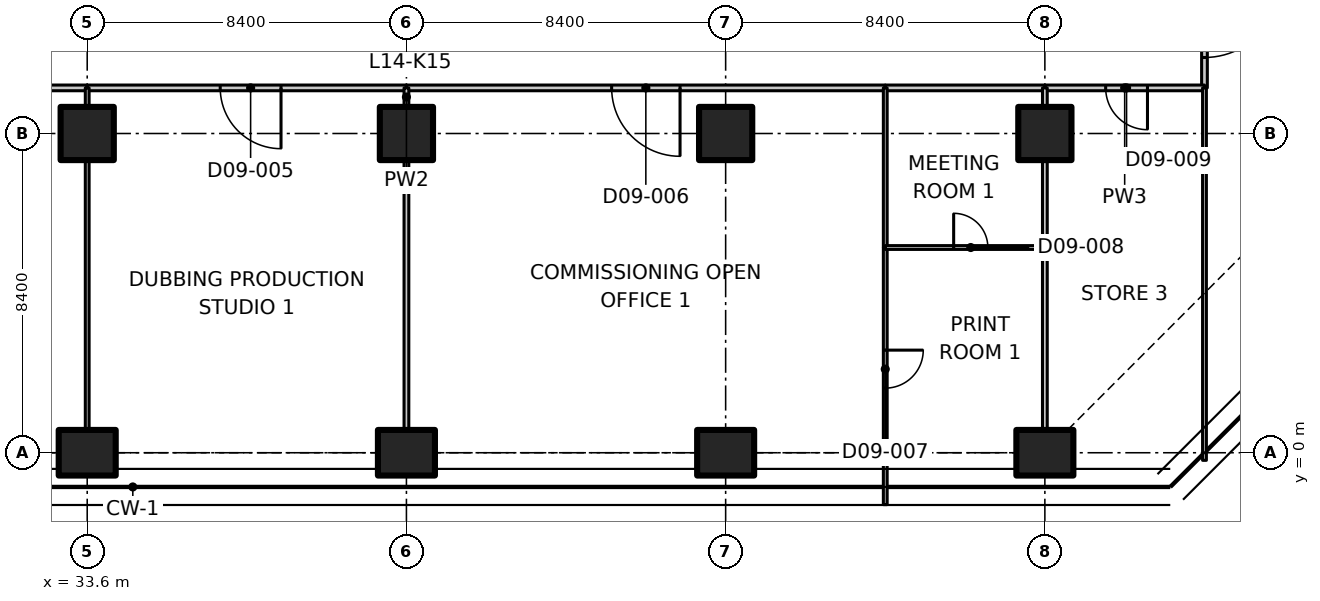
"""IFC4 building model, lengths in metres.
Left out: names, types, materials, properties, quantities, classifications, styles, units other than length and angle.
Written with IfcOpenShell. Run it as: python <this file> out.ifc"""

import sys

from ifc_helpers import new_model, si_unit, direction, frame, frame_2d, origin, origin_2d, place, context, subcontext, project, spatial, polyline, rectangle, outline, extrude, element, fill, save


model = new_model("IFC4")
c1 = context("Model", 3, precision=1e-05, world=origin(), true_north=direction((0.0, 1.0)))
c2 = subcontext(c1, "Body", "Model", "MODEL_VIEW")
j1 = project(units=[si_unit("LENGTHUNIT", "METRE"), si_unit("PLANEANGLEUNIT", "RADIAN")], contexts=[c1])
p1 = place(None, origin())
s1 = spatial("IfcSite", under=j1, at=p1, CompositionType="ELEMENT")
p2 = place(p1, origin())
s2 = spatial("IfcBuilding", under=s1, at=p2, CompositionType="ELEMENT")
p3 = place(p2, frame((0.0, 0.0, 65.3)))
s3 = spatial("IfcBuildingStorey", under=s2, at=p3, CompositionType="ELEMENT", Elevation=65.3)
p4 = place(p3, frame((33.6, 0.0, 0.0), z_axis=(0.0, 0.0, 1.0), x_axis=(0.0, 1.0, 0.0)))
e1 = element("IfcColumn", 1, at=p4, inside=s3, PredefinedType="COLUMN", context=c2, shape_type="SweptSolid", body=[
    extrude(rectangle(XDim=1.2, YDim=1.5, at=origin_2d()), origin(), (0.0, 0.0, 1.0), 3.35),
])
p5 = place(p3, frame((33.6, 8.4, 0.0), z_axis=(0.0, 0.0, 1.0), x_axis=(1.0, 0.0, 0.0)))
e2 = element("IfcColumn", 2, at=p5, inside=s3, PredefinedType="COLUMN", context=c2, shape_type="SweptSolid", body=[
    extrude(rectangle(XDim=1.4, YDim=1.4, at=origin_2d()), origin(), (0.0, 0.0, 1.0), 3.35),
])
p6 = place(p3, frame((42.0, 0.0, 0.0), z_axis=(0.0, 0.0, 1.0), x_axis=(0.0, 1.0, 0.0)))
e3 = element("IfcColumn", 3, at=p6, inside=s3, PredefinedType="COLUMN", context=c2, shape_type="SweptSolid", body=[
    extrude(rectangle(XDim=1.2, YDim=1.5, at=origin_2d()), origin(), (0.0, 0.0, 1.0), 3.35),
])
p7 = place(p3, frame((42.0, 8.4, 0.0), z_axis=(0.0, 0.0, 1.0), x_axis=(1.0, 0.0, 0.0)))
e4 = element("IfcColumn", 4, at=p7, inside=s3, PredefinedType="COLUMN", context=c2, shape_type="SweptSolid", body=[
    extrude(rectangle(XDim=1.4, YDim=1.4, at=origin_2d()), origin(), (0.0, 0.0, 1.0), 3.35),
])
p8 = place(p3, frame((50.4, 0.0, 0.0), z_axis=(0.0, 0.0, 1.0), x_axis=(0.0, 1.0, 0.0)))
e5 = element("IfcColumn", 5, at=p8, inside=s3, PredefinedType="COLUMN", context=c2, shape_type="SweptSolid", body=[
    extrude(rectangle(XDim=1.2, YDim=1.5, at=origin_2d()), origin(), (0.0, 0.0, 1.0), 3.35),
])
p9 = place(p3, frame((50.4, 8.4, 0.0), z_axis=(0.0, 0.0, 1.0), x_axis=(1.0, 0.0, 0.0)))
e6 = element("IfcColumn", 6, at=p9, inside=s3, PredefinedType="COLUMN", context=c2, shape_type="SweptSolid", body=[
    extrude(rectangle(XDim=1.4, YDim=1.4, at=origin_2d()), origin(), (0.0, 0.0, 1.0), 3.35),
])
p10 = place(p3, frame((58.8, 0.0, 0.0), z_axis=(0.0, 0.0, 1.0), x_axis=(0.0, 1.0, 0.0)))
e7 = element("IfcColumn", 7, at=p10, inside=s3, PredefinedType="COLUMN", context=c2, shape_type="SweptSolid", body=[
    extrude(rectangle(XDim=1.2, YDim=1.5, at=origin_2d()), origin(), (0.0, 0.0, 1.0), 3.35),
])
p11 = place(p3, frame((58.8, 8.4, 0.0), z_axis=(0.0, 0.0, 1.0), x_axis=(1.0, 0.0, 0.0)))
e8 = element("IfcColumn", 8, at=p11, inside=s3, PredefinedType="COLUMN", context=c2, shape_type="SweptSolid", body=[
    extrude(rectangle(XDim=1.4, YDim=1.4, at=origin_2d()), origin(), (0.0, 0.0, 1.0), 3.35),
])
p12 = place(p3, frame((63.0, 13.0, 0.0), z_axis=(0.0, 0.0, 1.0), x_axis=(0.0, -1.0, 0.0)))
e9 = element("IfcWall", 9, at=p12, inside=s3, PredefinedType="PARTITIONING", context=c2, shape_type="SweptSolid", body=[
    extrude(rectangle(XDim=3.4, YDim=0.15, at=frame_2d((1.7, 0.0))), origin(), (0.0, 0.0, 1.0), 3.33),
])
p13 = place(p12, frame((0.6, 0.0, 0.0)))
e10 = element("IfcOpeningElement", 10, at=p13, cuts=e9, PredefinedType="OPENING", context=c2, shape_type="SweptSolid", body=[
    extrude(rectangle(XDim=2.0, YDim=2.4, at=frame_2d((1.0, 1.2))), frame((0.0, 0.085, 0.0), z_axis=(0.0, -1.0, 0.0), x_axis=(1.0, 0.0, 0.0)), (0.0, 0.0, 1.0), 0.17),
])
p14 = place(p3, frame((33.6, 9.6, 0.0), z_axis=(0.0, 0.0, 1.0), x_axis=(-1.0, 0.0, 0.0)))
e11 = element("IfcWall", 11, at=p14, inside=s3, PredefinedType="PARTITIONING", context=c2, shape_type="SweptSolid", body=[
    extrude(rectangle(XDim=4.2, YDim=0.15, at=frame_2d((2.1, 0.0))), origin(), (0.0, 0.0, 1.0), 3.33),
])
p15 = place(p14, frame((1.5, 0.0, 0.0)))
e12 = element("IfcOpeningElement", 12, at=p15, cuts=e11, PredefinedType="OPENING", context=c2, shape_type="SweptSolid", body=[
    extrude(rectangle(XDim=1.1, YDim=2.1, at=frame_2d((0.55, 1.05))), frame((0.0, 0.085, 0.0), z_axis=(0.0, -1.0, 0.0), x_axis=(1.0, 0.0, 0.0)), (0.0, 0.0, 1.0), 0.17),
])
p16 = place(p3, frame((42.0, 9.6, 0.0), z_axis=(0.0, 0.0, 1.0), x_axis=(-1.0, 0.0, 0.0)))
e13 = element("IfcWall", 13, at=p16, inside=s3, PredefinedType="PARTITIONING", context=c2, shape_type="SweptSolid", body=[
    extrude(rectangle(XDim=8.4, YDim=0.15, at=frame_2d((4.2, 0.0))), origin(), (0.0, 0.0, 1.0), 3.33),
])
p17 = place(p16, frame((3.3, 0.0, 0.0)))
e14 = element("IfcOpeningElement", 14, at=p17, cuts=e13, PredefinedType="OPENING", context=c2, shape_type="SweptSolid", body=[
    extrude(rectangle(XDim=1.6, YDim=2.1, at=frame_2d((0.8, 1.05))), frame((0.0, 0.085, 0.0), z_axis=(0.0, -1.0, 0.0), x_axis=(1.0, 0.0, 0.0)), (0.0, 0.0, 1.0), 0.17),
])
p18 = place(p3, frame((54.6, 9.6, 0.0), z_axis=(0.0, 0.0, 1.0), x_axis=(-1.0, 0.0, 0.0)))
e15 = element("IfcWall", 15, at=p18, inside=s3, PredefinedType="PARTITIONING", context=c2, shape_type="SweptSolid", body=[
    extrude(rectangle(XDim=12.6, YDim=0.15, at=frame_2d((6.3, 0.0))), origin(), (0.0, 0.0, 1.0), 3.33),
])
p19 = place(p18, frame((5.4, 0.0, 0.0)))
e16 = element("IfcOpeningElement", 16, at=p19, cuts=e15, PredefinedType="OPENING", context=c2, shape_type="SweptSolid", body=[
    extrude(rectangle(XDim=1.8, YDim=2.1, at=frame_2d((0.9, 1.05))), frame((0.0, 0.085, 0.0), z_axis=(0.0, -1.0, 0.0), x_axis=(1.0, 0.0, 0.0)), (0.0, 0.0, 1.0), 0.17),
])
p20 = place(p3, frame((58.8, 9.6, 0.0), z_axis=(0.0, 0.0, 1.0), x_axis=(-1.0, 0.0, 0.0)))
e17 = element("IfcWall", 17, at=p20, inside=s3, PredefinedType="PARTITIONING", context=c2, shape_type="SweptSolid", body=[
    extrude(rectangle(XDim=4.2, YDim=0.15, at=frame_2d((2.1, 0.0))), origin(), (0.0, 0.0, 1.0), 3.33),
])
p21 = place(p3, frame((63.0, 9.6, 0.0), z_axis=(0.0, 0.0, 1.0), x_axis=(-1.0, 0.0, 0.0)))
e18 = element("IfcWall", 18, at=p21, inside=s3, PredefinedType="PARTITIONING", context=c2, shape_type="SweptSolid", body=[
    extrude(rectangle(XDim=4.2, YDim=0.15, at=frame_2d((2.1, 0.0))), origin(), (0.0, 0.0, 1.0), 3.33),
])
p22 = place(p21, frame((1.5, 0.0, 0.0)))
e19 = element("IfcOpeningElement", 19, at=p22, cuts=e18, PredefinedType="OPENING", context=c2, shape_type="SweptSolid", body=[
    extrude(rectangle(XDim=1.1, YDim=2.1, at=frame_2d((0.55, 1.05))), frame((0.0, 0.085, 0.0), z_axis=(0.0, -1.0, 0.0), x_axis=(1.0, 0.0, 0.0)), (0.0, 0.0, 1.0), 0.17),
])
p23 = place(p3, frame((63.0, -0.2, 0.0), z_axis=(0.0, 0.0, 1.0), x_axis=(0.0, 1.0, 0.0)))
e20 = element("IfcWall", 20, at=p23, inside=s3, PredefinedType="PARTITIONING", context=c2, shape_type="SweptSolid", body=[
    extrude(outline(polyline([(0.0, 0.0), (9.8, 0.0), (9.8, 3.33), (5.066, 3.33), (5.064, 2.98), (3.736, 2.98), (3.734, 3.33), (0.0, 3.33), (0.0, 0.0)])), frame((0.0, 0.05, 0.0), z_axis=(0.0, -1.0, 0.0), x_axis=(1.0, 0.0, 0.0)), (0.0, 0.0, 1.0), 0.1),
])
p24 = place(p3, frame((33.6, 9.6, 0.0), z_axis=(0.0, 0.0, 1.0), x_axis=(0.0, -1.0, 0.0)))
e21 = element("IfcWall", 21, at=p24, inside=s3, PredefinedType="PARTITIONING", context=c2, shape_type="SweptSolid", body=[
    extrude(rectangle(XDim=0.48, YDim=0.1, at=frame_2d((0.24, 0.0))), origin(), (0.0, 0.0, 1.0), 3.33),
])
p25 = place(p3, frame((33.6, 7.68, 0.0), z_axis=(0.0, 0.0, 1.0), x_axis=(0.0, -1.0, 0.0)))
e22 = element("IfcWall", 22, at=p25, inside=s3, PredefinedType="PARTITIONING", context=c2, shape_type="SweptSolid", body=[
    extrude(rectangle(XDim=7.06, YDim=0.1, at=frame_2d((3.53, 0.0))), origin(), (0.0, 0.0, 1.0), 3.33),
])
p26 = place(p3, frame((42.0, 9.6, 0.0), z_axis=(0.0, 0.0, 1.0), x_axis=(0.0, -1.0, 0.0)))
e23 = element("IfcWall", 23, at=p26, inside=s3, PredefinedType="PARTITIONING", context=c2, shape_type="SweptSolid", body=[
    extrude(rectangle(XDim=0.48, YDim=0.125, at=frame_2d((0.24, 0.0))), origin(), (0.0, 0.0, 1.0), 3.33),
])
p27 = place(p3, frame((42.0, 7.68, 0.0), z_axis=(0.0, 0.0, 1.0), x_axis=(0.0, -1.0, 0.0)))
e24 = element("IfcWall", 24, at=p27, inside=s3, PredefinedType="PARTITIONING", context=c2, shape_type="SweptSolid", body=[
    extrude(rectangle(XDim=7.06, YDim=0.125, at=frame_2d((3.53, 0.0))), origin(), (0.0, 0.0, 1.0), 3.33),
])
p28 = place(p3, frame((54.6, 5.4, 0.0), z_axis=(0.0, 0.0, 1.0), x_axis=(0.0, -1.0, 0.0)))
e25 = element("IfcWall", 25, at=p28, inside=s3, PredefinedType="PARTITIONING", context=c2, shape_type="SweptSolid", body=[
    extrude(outline(polyline([(0.0, 0.0), (6.765, 0.0), (6.765, 3.33), (6.5, 3.33), (5.85, 3.33), (5.848, 2.98), (4.952, 2.98), (4.95, 3.33), (0.0, 3.33), (0.0, 0.0)])), frame((0.0, 0.05, 0.0), z_axis=(0.0, -1.0, 0.0), x_axis=(1.0, 0.0, 0.0)), (0.0, 0.0, 1.0), 0.1),
])
p29 = place(p28, frame((2.7, 0.0, 0.0)))
e26 = element("IfcOpeningElement", 26, at=p29, cuts=e25, PredefinedType="OPENING", context=c2, shape_type="SweptSolid", body=[
    extrude(rectangle(XDim=1.0, YDim=2.1, at=frame_2d((0.5, 1.05))), frame((0.0, 0.06, 0.0), z_axis=(0.0, -1.0, 0.0), x_axis=(1.0, 0.0, 0.0)), (0.0, 0.0, 1.0), 0.12),
])
p30 = place(p3, frame((54.6, 9.6, 0.0), z_axis=(0.0, 0.0, 1.0), x_axis=(0.0, -1.0, 0.0)))
e27 = element("IfcWall", 27, at=p30, inside=s3, PredefinedType="PARTITIONING", context=c2, shape_type="SweptSolid", body=[
    extrude(rectangle(XDim=4.2, YDim=0.1, at=frame_2d((2.1, 0.0))), origin(), (0.0, 0.0, 1.0), 3.33),
])
p31 = place(p3, frame((54.6, 5.4, 0.0), z_axis=(0.0, 0.0, 1.0), x_axis=(1.0, 0.0, 0.0)))
e28 = element("IfcWall", 28, at=p31, inside=s3, PredefinedType="PARTITIONING", context=c2, shape_type="SweptSolid", body=[
    extrude(rectangle(XDim=4.2, YDim=0.1, at=frame_2d((2.1, 0.0))), origin(), (0.0, 0.0, 1.0), 3.33),
])
p32 = place(p31, frame((1.8, 0.0, 0.0)))
e29 = element("IfcOpeningElement", 29, at=p32, cuts=e28, PredefinedType="OPENING", context=c2, shape_type="SweptSolid", body=[
    extrude(rectangle(XDim=0.9, YDim=2.1, at=frame_2d((0.45, 1.05))), frame((0.0, 0.06, 0.0), z_axis=(0.0, -1.0, 0.0), x_axis=(1.0, 0.0, 0.0)), (0.0, 0.0, 1.0), 0.12),
])
p33 = place(p3, frame((58.8, 5.4, 0.0), z_axis=(0.0, 0.0, 1.0), x_axis=(0.0, -1.0, 0.0)))
e30 = element("IfcWall", 30, at=p33, inside=s3, PredefinedType="PARTITIONING", context=c2, shape_type="SweptSolid", body=[
    extrude(rectangle(XDim=4.78, YDim=0.125, at=frame_2d((2.39, 0.0))), origin(), (0.0, 0.0, 1.0), 3.33),
])
p34 = place(p3, frame((58.8, 9.6, 0.0), z_axis=(0.0, 0.0, 1.0), x_axis=(0.0, -1.0, 0.0)))
e31 = element("IfcWall", 31, at=p34, inside=s3, PredefinedType="PARTITIONING", context=c2, shape_type="SweptSolid", body=[
    extrude(rectangle(XDim=0.48, YDim=0.125, at=frame_2d((0.24, 0.0))), origin(), (0.0, 0.0, 1.0), 3.33),
])
p35 = place(p3, frame((58.8, 7.68, 0.0), z_axis=(0.0, 0.0, 1.0), x_axis=(0.0, -1.0, 0.0)))
e32 = element("IfcWall", 32, at=p35, inside=s3, PredefinedType="PARTITIONING", context=c2, shape_type="SweptSolid", body=[
    extrude(rectangle(XDim=2.28, YDim=0.125, at=frame_2d((1.14, 0.0))), origin(), (0.0, 0.0, 1.0), 3.33),
])
p36 = place(p13, origin())
e33 = element("IfcDoor", 33, at=p36, inside=s3, OperationType="DOUBLE_DOOR_SINGLE_SWING", PredefinedType="DOOR", context=c2, shape_type="SweptSolid", body=[
    extrude(rectangle(XDim=2.0, YDim=2.4, at=frame_2d((1.0, 1.2))), frame((0.0, 0.025, 0.0), z_axis=(0.0, -1.0, 0.0), x_axis=(1.0, 0.0, 0.0)), (0.0, 0.0, 1.0), 0.05),
])
fill(e10, e33)
p37 = place(p17, origin())
e34 = element("IfcDoor", 34, at=p37, inside=s3, OperationType="DOUBLE_DOOR_SINGLE_SWING", PredefinedType="DOOR", context=c2, shape_type="SweptSolid", body=[
    extrude(rectangle(XDim=1.6, YDim=2.1, at=frame_2d((0.8, 1.05))), frame((0.0, 0.025, 0.0), z_axis=(0.0, -1.0, 0.0), x_axis=(1.0, 0.0, 0.0)), (0.0, 0.0, 1.0), 0.05),
])
fill(e14, e34)
p38 = place(p19, origin())
e35 = element("IfcDoor", 35, at=p38, inside=s3, OperationType="DOUBLE_DOOR_SINGLE_SWING", PredefinedType="DOOR", context=c2, shape_type="SweptSolid", body=[
    extrude(rectangle(XDim=1.8, YDim=2.1, at=frame_2d((0.9, 1.05))), frame((0.0, 0.025, 0.0), z_axis=(0.0, -1.0, 0.0), x_axis=(1.0, 0.0, 0.0)), (0.0, 0.0, 1.0), 0.05),
])
fill(e16, e35)
p39 = place(p29, origin())
e36 = element("IfcDoor", 36, at=p39, inside=s3, OperationType="SINGLE_SWING_LEFT", PredefinedType="DOOR", context=c2, shape_type="SweptSolid", body=[
    extrude(rectangle(XDim=1.0, YDim=2.1, at=frame_2d((0.5, 1.05))), frame((0.0, 0.025, 0.0), z_axis=(0.0, -1.0, 0.0), x_axis=(1.0, 0.0, 0.0)), (0.0, 0.0, 1.0), 0.05),
])
fill(e26, e36)
p40 = place(p32, origin())
e37 = element("IfcDoor", 37, at=p40, inside=s3, OperationType="SINGLE_SWING_LEFT", PredefinedType="DOOR", context=c2, shape_type="SweptSolid", body=[
    extrude(rectangle(XDim=0.9, YDim=2.1, at=frame_2d((0.45, 1.05))), frame((0.0, 0.025, 0.0), z_axis=(0.0, -1.0, 0.0), x_axis=(1.0, 0.0, 0.0)), (0.0, 0.0, 1.0), 0.05),
])
fill(e29, e37)
p41 = place(p22, origin())
e38 = element("IfcDoor", 38, at=p41, inside=s3, OperationType="SINGLE_SWING_LEFT", PredefinedType="DOOR", context=c2, shape_type="SweptSolid", body=[
    extrude(rectangle(XDim=1.1, YDim=2.1, at=frame_2d((0.55, 1.05))), frame((0.0, 0.025, 0.0), z_axis=(0.0, -1.0, 0.0), x_axis=(1.0, 0.0, 0.0)), (0.0, 0.0, 1.0), 0.05),
])
fill(e19, e38)
save(model, sys.argv[1])
